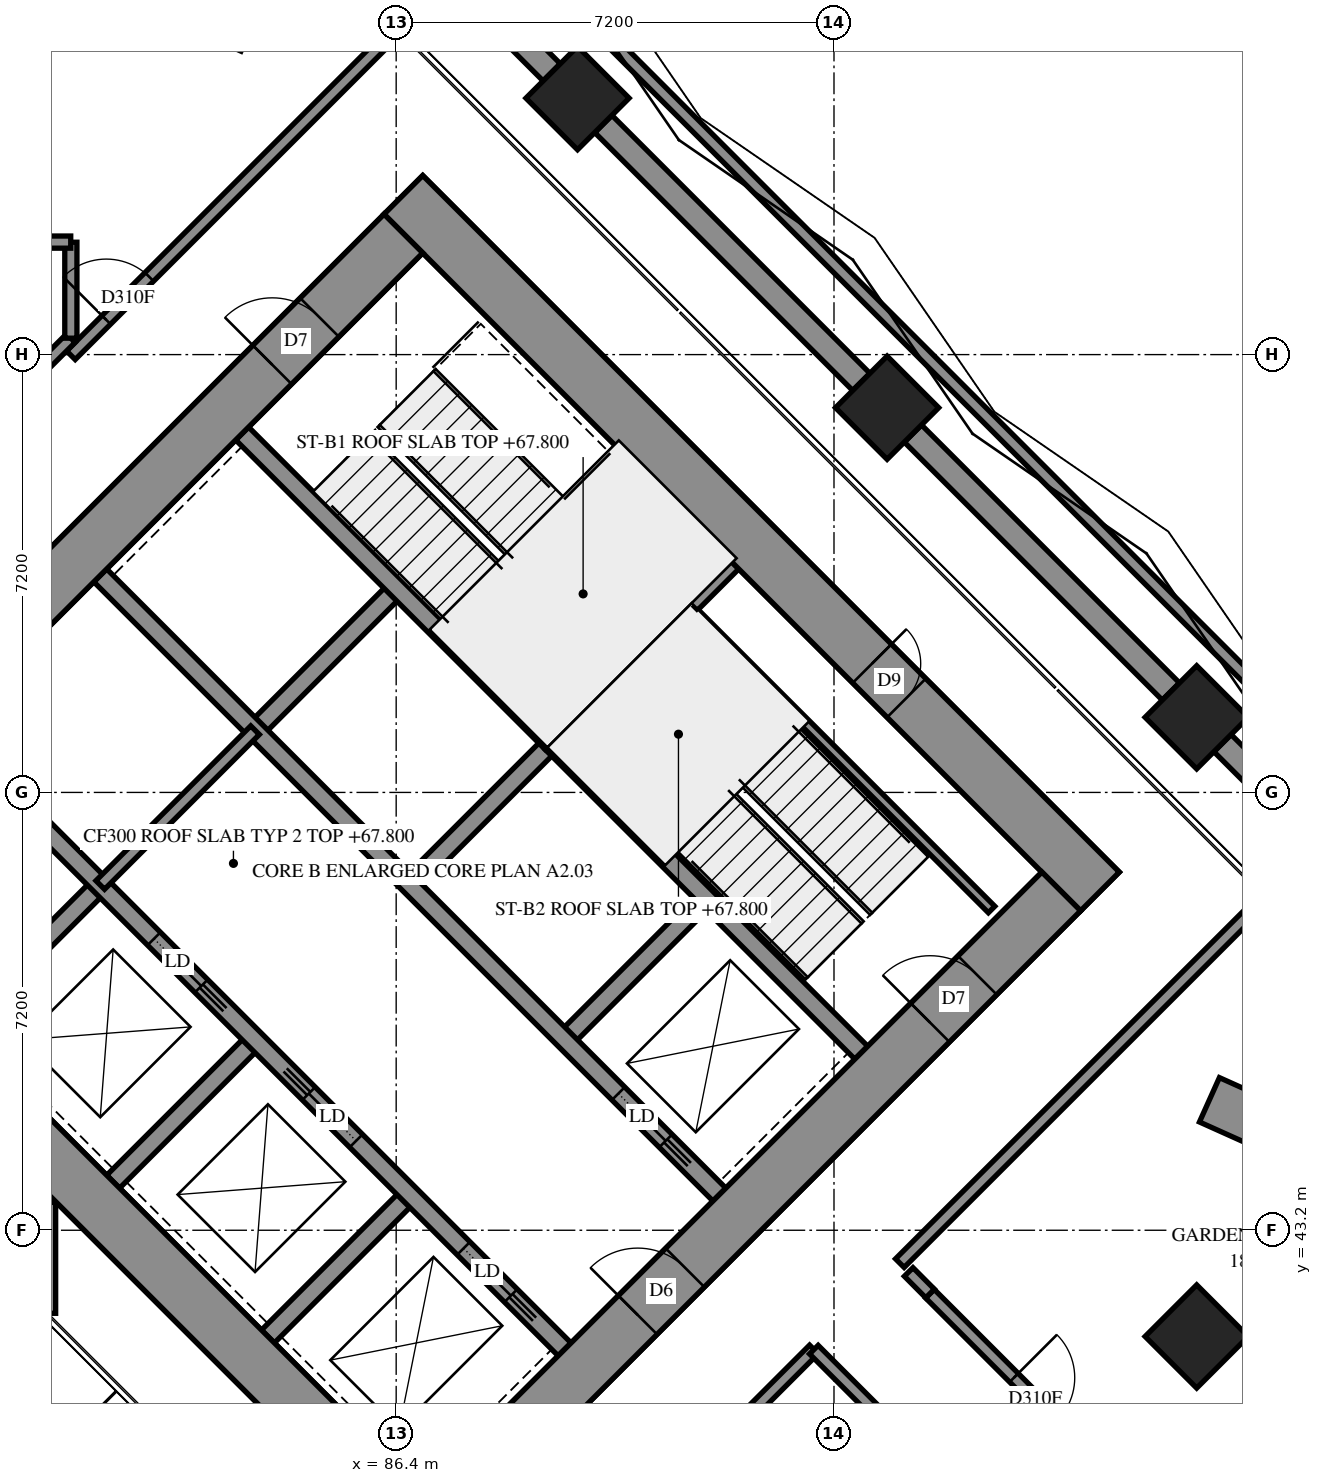
"""IFC4 building model, lengths in metres.
Left out: names, types, materials, properties, quantities, classifications, styles, units other than length and angle.
Written with IfcOpenShell. Run it as: python <this file> out.ifc"""

import sys

from ifc_helpers import new_model, si_unit, direction, frame, frame_2d, origin, origin_2d, place, context, subcontext, project, spatial, polyline, rectangle, outline, extrude, element, fill, save


model = new_model("IFC4")
c1 = context("Model", 3, precision=1e-05, world=origin(), true_north=direction((0.0, 1.0)))
c2 = subcontext(c1, "Body", "Model", "MODEL_VIEW")
j1 = project(units=[si_unit("LENGTHUNIT", "METRE"), si_unit("PLANEANGLEUNIT", "RADIAN")], contexts=[c1])
p1 = place(None, origin())
s1 = spatial("IfcSite", under=j1, at=p1, CompositionType="ELEMENT")
p2 = place(p1, origin())
s2 = spatial("IfcBuilding", under=s1, at=p2, CompositionType="ELEMENT")
p3 = place(p2, frame((0.0, 0.0, 67.8)))
s3 = spatial("IfcBuildingStorey", under=s2, at=p3, CompositionType="ELEMENT", Elevation=67.8)
for number, where, z_axis, x_axis in (
    (1, (89.382, 61.818, 0.0), (0.0, 0.0, 1.0), (0.707, -0.707, 0.0)),
    (2, (94.474, 56.727, 0.0), (0.0, 0.0, 1.0), (0.707, -0.707, 0.0)),
    (3, (99.565, 51.635, 0.0), (0.0, 0.0, 1.0), (0.707, -0.707, 0.0)),
    (4, (99.565, 41.453, 0.0), (0.0, 0.0, 1.0), (0.707, -0.707, 0.0)),
):
    element("IfcColumn", number, at=place(p3, frame(where, z_axis=z_axis, x_axis=x_axis)), inside=s3, PredefinedType="COLUMN", context=c2, shape_type="SweptSolid", body=[
        extrude(rectangle(XDim=1.2, YDim=1.2, at=origin_2d()), origin(), (0.0, 0.0, 1.0), 3.9),
    ])
p4 = place(p3, frame((75.7, 49.408, -0.3), z_axis=(0.0, 0.0, 1.0), x_axis=(0.7071098676, -0.7071036948, 0.0)))
e5 = element("IfcWall", 5, at=p4, inside=s3, PredefinedType="SHEAR", context=c2, shape_type="SweptSolid", body=[
    extrude(rectangle(XDim=16.2, YDim=0.9, at=frame_2d((8.1, 0.0))), origin(), (0.0, 0.0, 1.0), 3.5),
])
p5 = place(p3, frame((86.519, 60.227, -0.3), z_axis=(0.0, 0.0, 1.0), x_axis=(0.7071036948, -0.7071098676, 0.0)))
e6 = element("IfcWall", 6, at=p5, inside=s3, PredefinedType="SHEAR", context=c2, shape_type="SweptSolid", body=[
    extrude(rectangle(XDim=16.2, YDim=0.9, at=frame_2d((8.1, 0.0))), origin(), (0.0, 0.0, 1.0), 3.5),
])
p6 = place(p5, frame((10.9, 0.0, 0.3)))
e7 = element("IfcOpeningElement", 7, at=p6, cuts=e6, PredefinedType="OPENING", context=c2, shape_type="SweptSolid", body=[
    extrude(rectangle(XDim=0.8, YDim=2.1, at=frame_2d((0.4, 1.05))), frame((0.0, 0.46, 0.0), z_axis=(0.0, -1.0, 0.0), x_axis=(1.0, 0.0, 0.0)), (0.0, 0.0, 1.0), 0.92),
])
p7 = place(p3, frame((76.336, 49.408, -0.3), z_axis=(0.0, 0.0, 1.0), x_axis=(0.7071067812, 0.7071067812, 0.0)))
e8 = element("IfcWall", 8, at=p7, inside=s3, PredefinedType="SHEAR", context=c2, shape_type="SweptSolid", body=[
    extrude(rectangle(XDim=14.4, YDim=0.9, at=frame_2d((7.2, 0.0))), origin(), (0.0, 0.0, 1.0), 3.5),
])
p8 = place(p7, frame((4.55, 0.0, 0.3)))
e9 = element("IfcOpeningElement", 9, at=p8, cuts=e8, PredefinedType="OPENING", context=c2, shape_type="SweptSolid", body=[
    extrude(rectangle(XDim=1.1, YDim=2.1, at=frame_2d((0.55, 1.05))), frame((0.0, 0.46, 0.0), z_axis=(0.0, -1.0, 0.0), x_axis=(1.0, 0.0, 0.0)), (0.0, 0.0, 1.0), 0.92),
])
p9 = place(p7, frame((11.35, 0.0, 0.3)))
e10 = element("IfcOpeningElement", 10, at=p9, cuts=e8, PredefinedType="OPENING", context=c2, shape_type="SweptSolid", body=[
    extrude(rectangle(XDim=1.1, YDim=2.1, at=frame_2d((0.55, 1.05))), frame((0.0, 0.46, 0.0), z_axis=(0.0, -1.0, 0.0), x_axis=(1.0, 0.0, 0.0)), (0.0, 0.0, 1.0), 0.92),
])
p10 = place(p3, frame((87.155, 38.589, -0.3), z_axis=(0.0, 0.0, 1.0), x_axis=(0.7071067812, 0.7071067812, 0.0)))
e11 = element("IfcWall", 11, at=p10, inside=s3, PredefinedType="SHEAR", context=c2, shape_type="SweptSolid", body=[
    extrude(rectangle(XDim=14.4, YDim=0.9, at=frame_2d((7.2, 0.0))), origin(), (0.0, 0.0, 1.0), 3.5),
])
p11 = place(p10, frame((4.55, 0.0, 0.3)))
e12 = element("IfcOpeningElement", 12, at=p11, cuts=e11, PredefinedType="OPENING", context=c2, shape_type="SweptSolid", body=[
    extrude(rectangle(XDim=1.1, YDim=2.1, at=frame_2d((0.55, 1.05))), frame((0.0, 0.46, 0.0), z_axis=(0.0, -1.0, 0.0), x_axis=(1.0, 0.0, 0.0)), (0.0, 0.0, 1.0), 0.92),
])
p12 = place(p10, frame((11.35, 0.0, 0.3)))
e13 = element("IfcOpeningElement", 13, at=p12, cuts=e11, PredefinedType="OPENING", context=c2, shape_type="SweptSolid", body=[
    extrude(rectangle(XDim=1.1, YDim=2.1, at=frame_2d((0.55, 1.05))), frame((0.0, 0.46, 0.0), z_axis=(0.0, -1.0, 0.0), x_axis=(1.0, 0.0, 0.0)), (0.0, 0.0, 1.0), 0.92),
])
for number, where, z_axis, x_axis in (
    (14, (79.2, 46.544, 0.0), (0.0, 0.0, 1.0), (0.707, 0.707, 0.0)),
    (15, (84.079, 51.423, 0.0), (0.0, 0.0, 1.0), (0.707, 0.707, 0.0)),
):
    element("IfcWall", number, at=place(p3, frame(where, z_axis=z_axis, x_axis=x_axis)), inside=s3, PredefinedType="SOLIDWALL", context=c2, shape_type="SweptSolid", body=[
        extrude(rectangle(XDim=3.3, YDim=0.3, at=frame_2d((1.65, 0.0))), origin(), (0.0, 0.0, 1.0), 3.9),
    ])
p13 = place(p3, frame((81.746, 43.999, 0.0), z_axis=(0.0, 0.0, 1.0), x_axis=(0.7071067812, 0.7071067812, 0.0)))
e16 = element("IfcWall", 16, at=p13, inside=s3, PredefinedType="SOLIDWALL", context=c2, shape_type="SweptSolid", body=[
    extrude(rectangle(XDim=3.3, YDim=0.3, at=frame_2d((1.65, 0.0))), origin(), (0.0, 0.0, 1.0), 3.9),
])
p14 = place(p3, frame((86.625, 48.878, 0.0), z_axis=(0.0, 0.0, 1.0), x_axis=(0.7071067812, 0.7071067812, 0.0)))
e17 = element("IfcWall", 17, at=p14, inside=s3, PredefinedType="SOLIDWALL", context=c2, shape_type="SweptSolid", body=[
    extrude(rectangle(XDim=3.3, YDim=0.3, at=frame_2d((1.65, 0.0))), origin(), (0.0, 0.0, 1.0), 3.9),
])
p15 = place(p3, frame((84.291, 41.453, 0.0), z_axis=(0.0, 0.0, 1.0), x_axis=(0.7071067812, 0.7071067812, 0.0)))
e18 = element("IfcWall", 18, at=p15, inside=s3, PredefinedType="SOLIDWALL", context=c2, shape_type="SweptSolid", body=[
    extrude(rectangle(XDim=3.3, YDim=0.3, at=frame_2d((1.65, 0.0))), origin(), (0.0, 0.0, 1.0), 3.9),
])
p16 = place(p3, frame((89.17, 46.332, 0.0), z_axis=(0.0, 0.0, 1.0), x_axis=(0.7071067812, 0.7071067812, 0.0)))
e19 = element("IfcWall", 19, at=p16, inside=s3, PredefinedType="SOLIDWALL", context=c2, shape_type="SweptSolid", body=[
    extrude(rectangle(XDim=3.3, YDim=0.3, at=frame_2d((1.65, 0.0))), origin(), (0.0, 0.0, 1.0), 3.9),
])
p17 = place(p3, frame((78.988, 51.423, 0.0), z_axis=(0.0, 0.0, 1.0), x_axis=(0.7071067812, -0.7071067812, 0.0)))
e20 = element("IfcWall", 20, at=p17, inside=s3, PredefinedType="SOLIDWALL", context=c2, shape_type="SweptSolid", body=[
    extrude(rectangle(XDim=14.4, YDim=0.3, at=frame_2d((7.2, 0.0))), origin(), (0.0, 0.0, 1.0), 3.9),
])
p18 = place(p17, frame((1.25, 0.0, 0.0)))
e21 = element("IfcOpeningElement", 21, at=p18, cuts=e20, PredefinedType="OPENING", context=c2, shape_type="SweptSolid", body=[
    extrude(rectangle(XDim=1.1, YDim=2.1, at=frame_2d((0.55, 1.05))), frame((0.0, 0.16, 0.0), z_axis=(0.0, -1.0, 0.0), x_axis=(1.0, 0.0, 0.0)), (0.0, 0.0, 1.0), 0.32),
])
p19 = place(p17, frame((4.85, 0.0, 0.0)))
e22 = element("IfcOpeningElement", 22, at=p19, cuts=e20, PredefinedType="OPENING", context=c2, shape_type="SweptSolid", body=[
    extrude(rectangle(XDim=1.1, YDim=2.1, at=frame_2d((0.55, 1.05))), frame((0.0, 0.16, 0.0), z_axis=(0.0, -1.0, 0.0), x_axis=(1.0, 0.0, 0.0)), (0.0, 0.0, 1.0), 0.32),
])
p20 = place(p17, frame((8.45, 0.0, 0.0)))
e23 = element("IfcOpeningElement", 23, at=p20, cuts=e20, PredefinedType="OPENING", context=c2, shape_type="SweptSolid", body=[
    extrude(rectangle(XDim=1.1, YDim=2.1, at=frame_2d((0.55, 1.05))), frame((0.0, 0.16, 0.0), z_axis=(0.0, -1.0, 0.0), x_axis=(1.0, 0.0, 0.0)), (0.0, 0.0, 1.0), 0.32),
])
p21 = place(p17, frame((12.05, 0.0, 0.0)))
e24 = element("IfcOpeningElement", 24, at=p21, cuts=e20, PredefinedType="OPENING", context=c2, shape_type="SweptSolid", body=[
    extrude(rectangle(XDim=1.1, YDim=2.1, at=frame_2d((0.55, 1.05))), frame((0.0, 0.16, 0.0), z_axis=(0.0, -1.0, 0.0), x_axis=(1.0, 0.0, 0.0)), (0.0, 0.0, 1.0), 0.32),
])
p22 = place(p3, frame((81.534, 53.969, 0.0), z_axis=(0.0, 0.0, 1.0), x_axis=(0.707103309, -0.7071102534, 0.0)))
e25 = element("IfcWall", 25, at=p22, inside=s3, PredefinedType="SOLIDWALL", context=c2, shape_type="SweptSolid", body=[
    extrude(rectangle(XDim=14.4, YDim=0.3, at=frame_2d((7.2, 0.0))), origin(), (0.0, 0.0, 1.0), 3.9),
])
p23 = place(p22, frame((12.05, 0.0, 0.0)))
e26 = element("IfcOpeningElement", 26, at=p23, cuts=e25, PredefinedType="OPENING", context=c2, shape_type="SweptSolid", body=[
    extrude(rectangle(XDim=1.1, YDim=2.1, at=frame_2d((0.55, 1.05))), frame((0.0, 0.16, 0.0), z_axis=(0.0, -1.0, 0.0), x_axis=(1.0, 0.0, 0.0)), (0.0, 0.0, 1.0), 0.32),
])
for number, where, z_axis, x_axis in (
    (27, (83.867, 56.302, 0.0), (0.0, 0.0, 1.0), (0.707, -0.707, 0.0)),
    (28, (88.958, 51.211, 0.0), (0.0, 0.0, 1.0), (0.707, -0.707, 0.0)),
):
    element("IfcWall", number, at=place(p3, frame(where, z_axis=z_axis, x_axis=x_axis)), inside=s3, PredefinedType="SOLIDWALL", context=c2, shape_type="SweptSolid", body=[
        extrude(rectangle(XDim=7.2, YDim=0.3, at=frame_2d((3.6, 0.0))), origin(), (0.0, 0.0, 1.0), 3.9),
    ])
p24 = place(p3, frame((88.958, 51.211, 0.0), z_axis=(0.0, 0.0, 1.0), x_axis=(0.7071067812, 0.7071067812, 0.0)))
e29 = element("IfcWall", 29, at=p24, inside=s3, PredefinedType="SOLIDWALL", context=c2, shape_type="SweptSolid", body=[
    extrude(rectangle(XDim=4.2, YDim=0.3, at=frame_2d((2.1, 0.0))), origin(), (0.0, 0.0, 1.0), 3.9),
])
p25 = place(p3, frame((105.319, 42.853, 0.0), z_axis=(0.0, 0.0, 1.0), x_axis=(-0.9121070138, 0.4099521866, 0.0)))
e30 = element("IfcWall", 30, at=p25, inside=s3, PredefinedType="SOLIDWALL", context=c2, shape_type="SweptSolid", body=[
    extrude(rectangle(XDim=6.079, YDim=0.8, at=frame_2d((3.039, 0.0))), origin(), (0.0, 0.0, 1.0), 0.65),
])
p26 = place(p3, frame((112.929, 39.756, 0.0), z_axis=(0.0, 0.0, 1.0), x_axis=(-0.7071067812, 0.7071067812, 0.0)))
e31 = element("IfcWall", 31, at=p26, inside=s3, PredefinedType="SOLIDWALL", context=c2, shape_type="SweptSolid", body=[
    extrude(outline(polyline([(-0.1, -0.1), (47.126, -0.1), (47.044, 0.1), (0.1, 0.1), (-0.1, -0.1)])), origin(), (0.0, 0.0, 1.0), 4.2),
])
p27 = place(p3, frame((77.018, 42.15, 0.0), z_axis=(0.0, 0.0, 1.0), x_axis=(0.7071067812, -0.7071067812, 0.0)))
e32 = element("IfcWall", 32, at=p27, inside=s3, PredefinedType="SOLIDWALL", context=c2, shape_type="SweptSolid", body=[
    extrude(outline(polyline([(0.041, -0.1), (31.986, -0.1), (31.786, 0.1), (-0.041, 0.1), (0.041, -0.1)])), origin(), (0.0, 0.0, 1.0), 4.2),
])
p28 = place(p3, frame((91.313, 53.354, 0.0), z_axis=(0.0, 0.0, 1.0), x_axis=(0.7071140275, -0.7070995348, 0.0)))
e33 = element("IfcWall", 33, at=p28, inside=s3, PredefinedType="PARTITIONING", context=c2, shape_type="SweptSolid", body=[
    extrude(rectangle(XDim=6.9, YDim=0.15, at=frame_2d((3.45, 0.0))), origin(), (0.0, 0.0, 1.0), 3.9),
])
p29 = place(p3, frame((81.534, 48.878, 0.0), z_axis=(0.0, 0.0, 1.0), x_axis=(0.707092892, 0.7071206701, 0.0)))
e34 = element("IfcWall", 34, at=p29, inside=s3, PredefinedType="PARTITIONING", context=c2, shape_type="SweptSolid", body=[
    extrude(rectangle(XDim=3.6, YDim=0.2, at=frame_2d((1.8, 0.0))), origin(), (0.0, 0.0, 1.0), 3.9),
])
p30 = place(p3, frame((100.271, 37.069, 0.0), z_axis=(0.0, 0.0, 1.0), x_axis=(0.7071067812, 0.7071067812, 0.0)))
e35 = element("IfcWall", 35, at=p30, inside=s3, PredefinedType="PARTITIONING", context=c2, shape_type="SweptSolid", body=[
    extrude(rectangle(XDim=8.471, YDim=0.2, at=frame_2d((4.236, 0.0))), origin(), (0.0, 0.0, 1.0), 3.9),
])
p31 = place(p3, frame((94.683, 42.659, 0.0), z_axis=(0.0, 0.0, 1.0), x_axis=(0.7072248389, 0.7069887037, 0.0)))
e36 = element("IfcWall", 36, at=p31, inside=s3, PredefinedType="PARTITIONING", context=c2, shape_type="SweptSolid", body=[
    extrude(rectangle(XDim=8.47, YDim=0.2, at=frame_2d((4.235, 0.0))), origin(), (0.0, 0.0, 1.0), 3.9),
])
p32 = place(p3, frame((87.281, 35.252, 0.0), z_axis=(0.0, 0.0, 1.0), x_axis=(0.7071067812, 0.7071067812, 0.0)))
e37 = element("IfcWall", 37, at=p32, inside=s3, PredefinedType="PARTITIONING", context=c2, shape_type="SweptSolid", body=[
    extrude(rectangle(XDim=8.468, YDim=0.2, at=frame_2d((4.234, 0.0))), origin(), (0.0, 0.0, 1.0), 3.9),
])
p33 = place(p3, frame((93.269, 41.237, 0.0), z_axis=(0.0, 0.0, 1.0), x_axis=(0.7071067812, -0.7071067812, 0.0)))
e38 = element("IfcWall", 38, at=p33, inside=s3, PredefinedType="PARTITIONING", context=c2, shape_type="SweptSolid", body=[
    extrude(rectangle(XDim=7.9, YDim=0.2, at=frame_2d((3.95, 0.0))), origin(), (0.0, 0.0, 1.0), 3.9),
])
p34 = place(p33, frame((2.656, 0.0, 0.0)))
e39 = element("IfcOpeningElement", 39, at=p34, cuts=e38, PredefinedType="OPENING", context=c2, shape_type="SweptSolid", body=[
    extrude(rectangle(XDim=1.0, YDim=2.1, at=frame_2d((0.5, 1.05))), frame((0.0, 0.11, 0.0), z_axis=(0.0, -1.0, 0.0), x_axis=(1.0, 0.0, 0.0)), (0.0, 0.0, 1.0), 0.22),
])
p35 = place(p3, frame((81.051, 57.589, 0.0), z_axis=(0.0, 0.0, 1.0), x_axis=(0.7071067812, 0.7071067812, 0.0)))
e40 = element("IfcWall", 40, at=p35, inside=s3, PredefinedType="PARTITIONING", context=c2, shape_type="SweptSolid", body=[
    extrude(rectangle(XDim=7.552, YDim=0.2, at=frame_2d((3.776, 0.0))), origin(), (0.0, 0.0, 1.0), 3.9),
])
p36 = place(p35, frame((0.823, 0.0, 0.0)))
e41 = element("IfcOpeningElement", 41, at=p36, cuts=e40, PredefinedType="OPENING", context=c2, shape_type="SweptSolid", body=[
    extrude(rectangle(XDim=1.0, YDim=2.1, at=frame_2d((0.5, 1.05))), frame((0.0, 0.11, 0.0), z_axis=(0.0, -1.0, 0.0), x_axis=(1.0, 0.0, 0.0)), (0.0, 0.0, 1.0), 0.22),
])
p37 = place(p3, frame((95.177, 42.157, 0.0), z_axis=(0.0, 0.0, 1.0), x_axis=(0.7071067812, -0.7071067812, 0.0)))
e42 = element("IfcWall", 42, at=p37, inside=s3, PredefinedType="PARTITIONING", context=c2, shape_type="SweptSolid", body=[
    extrude(rectangle(XDim=7.201, YDim=0.2, at=frame_2d((3.601, 0.0))), origin(), (0.0, 0.0, 1.0), 3.9),
])
p38 = place(p37, frame((1.954, 0.0, 0.0)))
e43 = element("IfcOpeningElement", 43, at=p38, cuts=e42, PredefinedType="OPENING", context=c2, shape_type="SweptSolid", body=[
    extrude(rectangle(XDim=1.0, YDim=2.1, at=frame_2d((0.5, 1.05))), frame((0.0, 0.11, 0.0), z_axis=(0.0, -1.0, 0.0), x_axis=(1.0, 0.0, 0.0)), (0.0, 0.0, 1.0), 0.22),
])
p39 = place(p3, frame((80.7, 41.834, 0.0), z_axis=(0.0, 0.0, 1.0), x_axis=(0.0, 1.0, 0.0)))
e44 = element("IfcWall", 44, at=p39, inside=s3, PredefinedType="PARTITIONING", context=c2, shape_type="SweptSolid", body=[
    extrude(rectangle(XDim=1.824, YDim=0.2, at=frame_2d((0.912, 0.0))), origin(), (0.0, 0.0, 1.0), 3.9),
])
p40 = place(p3, frame((79.802, 56.623, 0.0), z_axis=(0.0, 0.0, 1.0), x_axis=(0.7071067812, 0.7071067812, 0.0)))
e45 = element("IfcWall", 45, at=p40, inside=s3, PredefinedType="PARTITIONING", context=c2, shape_type="SweptSolid", body=[
    extrude(rectangle(XDim=1.765, YDim=0.2, at=frame_2d((0.882, 0.0))), origin(), (0.0, 0.0, 1.0), 3.9),
])
p41 = place(p3, frame((81.05, 57.87, 0.0), z_axis=(0.0, 0.0, 1.0), x_axis=(0.0, 1.0, 0.0)))
e46 = element("IfcWall", 46, at=p41, inside=s3, PredefinedType="PARTITIONING", context=c2, shape_type="SweptSolid", body=[
    extrude(rectangle(XDim=1.578, YDim=0.2, at=frame_2d((0.789, 0.0))), origin(), (0.0, 0.0, 1.0), 3.9),
])
p42 = place(p3, frame((79.8, 59.45, 0.0), z_axis=(0.0, 0.0, 1.0), x_axis=(1.0, 0.0, 0.0)))
e47 = element("IfcWall", 47, at=p42, inside=s3, PredefinedType="PARTITIONING", context=c2, shape_type="SweptSolid", body=[
    extrude(rectangle(XDim=1.248, YDim=0.2, at=frame_2d((0.624, 0.0))), origin(), (0.0, 0.0, 1.0), 3.9),
])
p43 = place(p3, frame((94.828, 42.514, 0.0), z_axis=(0.0, 0.0, 1.0), x_axis=(0.7051008166, -0.7091070712, 0.0)))
e48 = element("IfcWall", 48, at=p43, inside=s3, PredefinedType="PARTITIONING", context=c2, shape_type="SweptSolid", body=[
    extrude(rectangle(XDim=0.499, YDim=0.2, at=frame_2d((0.25, 0.0))), origin(), (0.0, 0.0, 1.0), 3.9),
])
p44 = place(p6, origin())
e49 = element("IfcDoor", 49, at=p44, inside=s3, OperationType="SINGLE_SWING_RIGHT", PredefinedType="DOOR", context=c2, shape_type="SweptSolid", body=[
    extrude(rectangle(XDim=0.8, YDim=2.1, at=frame_2d((0.4, 1.05))), frame((0.0, -0.39, 0.0), z_axis=(0.0, -1.0, 0.0), x_axis=(1.0, 0.0, 0.0)), (0.0, 0.0, 1.0), 0.05),
])
fill(e7, e49)
p45 = place(p11, origin())
e50 = element("IfcDoor", 50, at=p45, inside=s3, OperationType="DOUBLE_DOOR_SINGLE_SWING", PredefinedType="DOOR", context=c2, shape_type="SweptSolid", body=[
    extrude(rectangle(XDim=1.1, YDim=2.1, at=frame_2d((0.55, 1.05))), frame((0.0, 0.025, 0.0), z_axis=(0.0, -1.0, 0.0), x_axis=(1.0, 0.0, 0.0)), (0.0, 0.0, 1.0), 0.05),
])
fill(e12, e50)
p46 = place(p9, origin())
e51 = element("IfcDoor", 51, at=p46, inside=s3, OperationType="SINGLE_SWING_LEFT", PredefinedType="DOOR", context=c2, shape_type="SweptSolid", body=[
    extrude(rectangle(XDim=1.1, YDim=2.1, at=frame_2d((0.55, 1.05))), frame((0.0, 0.025, 0.0), z_axis=(0.0, -1.0, 0.0), x_axis=(1.0, 0.0, 0.0)), (0.0, 0.0, 1.0), 0.05),
])
fill(e10, e51)
p47 = place(p12, origin())
e52 = element("IfcDoor", 52, at=p47, inside=s3, OperationType="SINGLE_SWING_RIGHT", PredefinedType="DOOR", context=c2, shape_type="SweptSolid", body=[
    extrude(rectangle(XDim=1.1, YDim=2.1, at=frame_2d((0.55, 1.05))), frame((0.0, 0.025, 0.0), z_axis=(0.0, -1.0, 0.0), x_axis=(1.0, 0.0, 0.0)), (0.0, 0.0, 1.0), 0.05),
])
fill(e13, e52)
p48 = place(p19, origin())
e53 = element("IfcDoor", 53, at=p48, inside=s3, OperationType="SLIDING_TO_RIGHT", PredefinedType="DOOR", context=c2, shape_type="SweptSolid", body=[
    extrude(rectangle(XDim=1.1, YDim=2.1, at=frame_2d((0.55, 1.05))), frame((0.0, 0.025, 0.0), z_axis=(0.0, -1.0, 0.0), x_axis=(1.0, 0.0, 0.0)), (0.0, 0.0, 1.0), 0.05),
])
fill(e22, e53)
p49 = place(p20, origin())
e54 = element("IfcDoor", 54, at=p49, inside=s3, OperationType="SLIDING_TO_LEFT", PredefinedType="DOOR", context=c2, shape_type="SweptSolid", body=[
    extrude(rectangle(XDim=1.1, YDim=2.1, at=frame_2d((0.55, 1.05))), frame((0.0, 0.025, 0.0), z_axis=(0.0, -1.0, 0.0), x_axis=(1.0, 0.0, 0.0)), (0.0, 0.0, 1.0), 0.05),
])
fill(e23, e54)
p50 = place(p21, origin())
e55 = element("IfcDoor", 55, at=p50, inside=s3, OperationType="SLIDING_TO_RIGHT", PredefinedType="DOOR", context=c2, shape_type="SweptSolid", body=[
    extrude(rectangle(XDim=1.1, YDim=2.1, at=frame_2d((0.55, 1.05))), frame((0.0, 0.025, 0.0), z_axis=(0.0, -1.0, 0.0), x_axis=(1.0, 0.0, 0.0)), (0.0, 0.0, 1.0), 0.05),
])
fill(e24, e55)
p51 = place(p23, origin())
e56 = element("IfcDoor", 56, at=p51, inside=s3, OperationType="SLIDING_TO_RIGHT", PredefinedType="DOOR", context=c2, shape_type="SweptSolid", body=[
    extrude(rectangle(XDim=1.1, YDim=2.1, at=frame_2d((0.55, 1.05))), frame((0.0, 0.025, 0.0), z_axis=(0.0, -1.0, 0.0), x_axis=(1.0, 0.0, 0.0)), (0.0, 0.0, 1.0), 0.05),
])
fill(e26, e56)
p52 = place(p36, origin())
e57 = element("IfcDoor", 57, at=p52, inside=s3, OperationType="SINGLE_SWING_RIGHT", PredefinedType="DOOR", context=c2, shape_type="SweptSolid", body=[
    extrude(rectangle(XDim=1.0, YDim=2.1, at=frame_2d((0.5, 1.05))), frame((0.0, 0.025, 0.0), z_axis=(0.0, -1.0, 0.0), x_axis=(1.0, 0.0, 0.0)), (0.0, 0.0, 1.0), 0.05),
])
fill(e41, e57)
p53 = place(p38, origin())
e58 = element("IfcDoor", 58, at=p53, inside=s3, OperationType="SINGLE_SWING_RIGHT", PredefinedType="DOOR", context=c2, shape_type="SweptSolid", body=[
    extrude(rectangle(XDim=1.0, YDim=2.1, at=frame_2d((0.5, 1.05))), frame((0.0, 0.025, 0.0), z_axis=(0.0, -1.0, 0.0), x_axis=(1.0, 0.0, 0.0)), (0.0, 0.0, 1.0), 0.05),
])
fill(e43, e58)
save(model, sys.argv[1])
